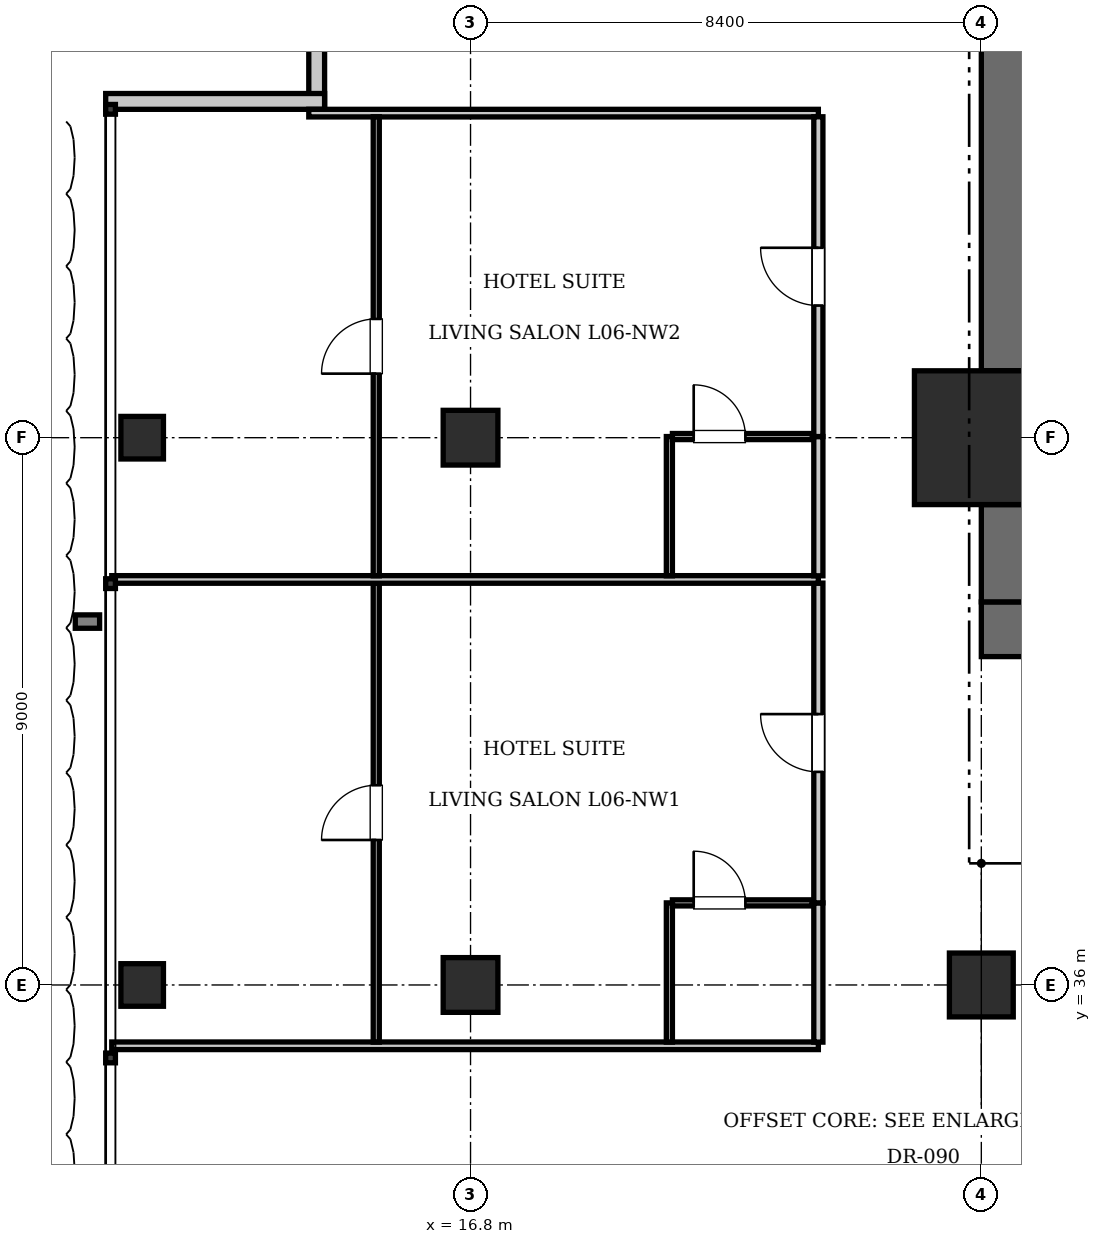
"""IFC4 building model, lengths in metres.
Left out: names, types, materials, properties, quantities, classifications, styles, units other than length and angle.
Written with IfcOpenShell. Run it as: python <this file> out.ifc"""

import sys

from ifc_helpers import new_model, si_unit, direction, frame, frame_2d, origin, origin_2d, place, context, subcontext, project, spatial, rectangle, i_section, extrude, element, fill, save


model = new_model("IFC4")
c1 = context("Model", 3, precision=1e-05, world=origin(), true_north=direction((0.0, 1.0)))
c2 = subcontext(c1, "Body", "Model", "MODEL_VIEW")
j1 = project(units=[si_unit("LENGTHUNIT", "METRE"), si_unit("PLANEANGLEUNIT", "RADIAN")], contexts=[c1])
p1 = place(None, origin())
s1 = spatial("IfcSite", under=j1, at=p1, CompositionType="ELEMENT")
p2 = place(p1, origin())
s2 = spatial("IfcBuilding", under=s1, at=p2, CompositionType="ELEMENT")
p3 = place(p2, frame((0.0, 0.0, 30.8)))
s3 = spatial("IfcBuildingStorey", under=s2, at=p3, CompositionType="ELEMENT", Elevation=30.8)
p4 = place(p3, frame((25.2, 45.0, 0.0), z_axis=(0.0, 0.0, 1.0), x_axis=(1.0, 0.0, 0.0)))
e1 = element("IfcColumn", 1, at=p4, inside=s3, PredefinedType="COLUMN", context=c2, shape_type="SweptSolid", body=[
    extrude(rectangle(XDim=2.2, YDim=2.2, at=origin_2d()), origin(), (0.0, 0.0, 1.0), 3.85),
])
p5 = place(p3, frame((25.2, 41.85, 0.0), z_axis=(0.0, 0.0, 1.0), x_axis=(1.0, 0.0, 0.0)))
e2 = element("IfcWall", 2, at=p5, inside=s3, PredefinedType="SHEAR", context=c2, shape_type="SweptSolid", body=[
    extrude(rectangle(XDim=6.8, YDim=0.9, at=frame_2d((3.4, 0.0))), origin(), (0.0, 0.0, 1.0), 3.85),
])
p6 = place(p5, frame((1.65, 0.0, 0.0)))
e3 = element("IfcOpeningElement", 3, at=p6, cuts=e2, PredefinedType="OPENING", context=c2, shape_type="SweptSolid", body=[
    extrude(rectangle(XDim=1.15, YDim=2.15, at=frame_2d((0.575, 1.075))), frame((0.0, 0.46, 0.0), z_axis=(0.0, -1.0, 0.0), x_axis=(1.0, 0.0, 0.0)), (0.0, 0.0, 1.0), 0.92),
])
p7 = place(p5, frame((5.15, 0.0, 0.0)))
e4 = element("IfcOpeningElement", 4, at=p7, cuts=e2, PredefinedType="OPENING", context=c2, shape_type="SweptSolid", body=[
    extrude(rectangle(XDim=1.1, YDim=2.2, at=frame_2d((0.55, 1.1))), frame((0.0, 0.46, 0.0), z_axis=(0.0, -1.0, 0.0), x_axis=(1.0, 0.0, 0.0)), (0.0, 0.0, 1.0), 0.92),
])
p8 = place(p3, frame((25.65, 42.3, 0.0), z_axis=(0.0, 0.0, 1.0), x_axis=(0.0, 1.0, 0.0)))
e5 = element("IfcWall", 5, at=p8, inside=s3, PredefinedType="SHEAR", context=c2, shape_type="SweptSolid", body=[
    extrude(rectangle(XDim=1.6, YDim=0.9, at=frame_2d((0.8, 0.0))), origin(), (0.0, 0.0, 1.0), 3.85),
])
p9 = place(p3, frame((25.65, 46.1, 0.0), z_axis=(0.0, 0.0, 1.0), x_axis=(0.0, 1.0, 0.0)))
e6 = element("IfcWall", 6, at=p9, inside=s3, PredefinedType="SHEAR", context=c2, shape_type="SweptSolid", body=[
    extrude(rectangle(XDim=7.0, YDim=0.9, at=frame_2d((3.5, 0.0))), origin(), (0.0, 0.0, 1.0), 3.85),
])
p10 = place(p3, frame((25.2, 36.0, 0.0), z_axis=(0.0, 0.0, 1.0), x_axis=(1.0, 0.0, 0.0)))
e7 = element("IfcColumn", 7, at=p10, inside=s3, PredefinedType="COLUMN", context=c2, shape_type="SweptSolid", body=[
    extrude(rectangle(XDim=1.05, YDim=1.05, at=origin_2d()), origin(), (0.0, 0.0, 1.0), 3.85),
])
for number, where, z_axis, x_axis in (
    (8, (16.8, 36.0, 0.0), (0.0, 0.0, 1.0), (1.0, 0.0, 0.0)),
    (9, (16.8, 45.0, 0.0), (0.0, 0.0, 1.0), (1.0, 0.0, 0.0)),
):
    element("IfcColumn", number, at=place(p3, frame(where, z_axis=z_axis, x_axis=x_axis)), inside=s3, PredefinedType="COLUMN", context=c2, shape_type="SweptSolid", body=[
        extrude(rectangle(XDim=0.9, YDim=0.9, at=origin_2d()), origin(), (0.0, 0.0, 1.0), 3.85),
    ])
for number, where, z_axis, x_axis in (
    (10, (11.4, 36.0, 0.0), (0.0, 0.0, 1.0), (1.0, 0.0, 0.0)),
    (11, (11.4, 45.0, 0.0), (0.0, 0.0, 1.0), (1.0, 0.0, 0.0)),
):
    element("IfcColumn", number, at=place(p3, frame(where, z_axis=z_axis, x_axis=x_axis)), inside=s3, PredefinedType="COLUMN", context=c2, shape_type="SweptSolid", body=[
        extrude(i_section(OverallWidth=0.7, OverallDepth=0.7, WebThickness=0.028, FlangeThickness=0.044, at=origin_2d()), origin(), (0.0, 0.0, 1.0), 3.85),
    ])
p11 = place(p3, frame((14.27, 50.4, 0.0), z_axis=(0.0, 0.0, 1.0), x_axis=(0.0, 1.0, 0.0)))
e12 = element("IfcWall", 12, at=p11, inside=s3, PredefinedType="SOLIDWALL", context=c2, shape_type="SweptSolid", body=[
    extrude(rectangle(XDim=3.6, YDim=0.26, at=frame_2d((1.8, 0.0))), origin(), (0.0, 0.0, 1.0), 3.61),
])
p12 = place(p3, frame((10.8, 50.53, 0.0), z_axis=(0.0, 0.0, 1.0), x_axis=(1.0, 0.0, 0.0)))
e13 = element("IfcWall", 13, at=p12, inside=s3, PredefinedType="SOLIDWALL", context=c2, shape_type="SweptSolid", body=[
    extrude(rectangle(XDim=3.6, YDim=0.26, at=frame_2d((1.8, 0.0))), origin(), (0.0, 0.0, 1.0), 3.61),
])
p13 = place(p3, frame((10.9, 35.0, 0.0), z_axis=(0.0, 0.0, 1.0), x_axis=(1.0, 0.0, 0.0)))
e14 = element("IfcWall", 14, at=p13, inside=s3, PredefinedType="PARTITIONING", context=c2, shape_type="SweptSolid", body=[
    extrude(rectangle(XDim=11.62, YDim=0.125, at=frame_2d((5.81, 0.0))), origin(), (0.0, 0.0, 1.0), 3.61),
])
p14 = place(p3, frame((14.14, 50.337, 0.0), z_axis=(0.0, 0.0, 1.0), x_axis=(1.0, 0.0, 0.0)))
e15 = element("IfcWall", 15, at=p14, inside=s3, PredefinedType="PARTITIONING", context=c2, shape_type="SweptSolid", body=[
    extrude(rectangle(XDim=8.38, YDim=0.125, at=frame_2d((4.19, 0.0))), origin(), (0.0, 0.0, 1.0), 3.61),
])
p15 = place(p3, frame((22.52, 35.06, 0.0), z_axis=(0.0, 0.0, 1.0), x_axis=(0.0, 1.0, 0.0)))
e16 = element("IfcWall", 16, at=p15, inside=s3, PredefinedType="PARTITIONING", context=c2, shape_type="SweptSolid", body=[
    extrude(rectangle(XDim=2.29, YDim=0.15, at=frame_2d((1.145, 0.0))), origin(), (0.0, 0.0, 1.0), 3.61),
])
p16 = place(p3, frame((22.52, 37.35, 0.0), z_axis=(0.0, 0.0, 1.0), x_axis=(0.0, 1.0, 0.0)))
e17 = element("IfcWall", 17, at=p16, inside=s3, PredefinedType="PARTITIONING", context=c2, shape_type="SweptSolid", body=[
    extrude(rectangle(XDim=5.259, YDim=0.15, at=frame_2d((2.629, 0.0))), origin(), (0.0, 0.0, 1.0), 3.61),
])
p17 = place(p16, frame((2.154, 0.0, 0.0)))
e18 = element("IfcOpeningElement", 18, at=p17, cuts=e17, PredefinedType="OPENING", context=c2, shape_type="SweptSolid", body=[
    extrude(rectangle(XDim=0.95, YDim=2.15, at=frame_2d((0.475, 1.075))), frame((0.0, 0.085, 0.0), z_axis=(0.0, -1.0, 0.0), x_axis=(1.0, 0.0, 0.0)), (0.0, 0.0, 1.0), 0.17),
])
p18 = place(p3, frame((20.07, 35.06, 0.0), z_axis=(0.0, 0.0, 1.0), x_axis=(0.0, 1.0, 0.0)))
e19 = element("IfcWall", 19, at=p18, inside=s3, PredefinedType="PARTITIONING", context=c2, shape_type="SweptSolid", body=[
    extrude(rectangle(XDim=2.29, YDim=0.1, at=frame_2d((1.145, 0.0))), origin(), (0.0, 0.0, 1.0), 3.61),
])
p19 = place(p3, frame((20.12, 37.35, 0.0), z_axis=(0.0, 0.0, 1.0), x_axis=(1.0, 0.0, 0.0)))
e20 = element("IfcWall", 20, at=p19, inside=s3, PredefinedType="PARTITIONING", context=c2, shape_type="SweptSolid", body=[
    extrude(rectangle(XDim=2.3, YDim=0.1, at=frame_2d((1.15, 0.0))), origin(), (0.0, 0.0, 1.0), 3.61),
])
p20 = place(p19, frame((0.35, 0.0, 0.0)))
e21 = element("IfcOpeningElement", 21, at=p20, cuts=e20, PredefinedType="OPENING", context=c2, shape_type="SweptSolid", body=[
    extrude(rectangle(XDim=0.85, YDim=2.1, at=frame_2d((0.425, 1.05))), frame((0.0, 0.06, 0.0), z_axis=(0.0, -1.0, 0.0), x_axis=(1.0, 0.0, 0.0)), (0.0, 0.0, 1.0), 0.12),
])
p21 = place(p3, frame((15.25, 35.06, 0.0), z_axis=(0.0, 0.0, 1.0), x_axis=(0.0, 1.0, 0.0)))
e22 = element("IfcWall", 22, at=p21, inside=s3, PredefinedType="PARTITIONING", context=c2, shape_type="SweptSolid", body=[
    extrude(rectangle(XDim=7.549, YDim=0.1, at=frame_2d((3.774, 0.0))), origin(), (0.0, 0.0, 1.0), 3.61),
])
p22 = place(p21, frame((3.324, 0.0, 0.0)))
e23 = element("IfcOpeningElement", 23, at=p22, cuts=e22, PredefinedType="OPENING", context=c2, shape_type="SweptSolid", body=[
    extrude(rectangle(XDim=0.9, YDim=2.1, at=frame_2d((0.45, 1.05))), frame((0.0, 0.06, 0.0), z_axis=(0.0, -1.0, 0.0), x_axis=(1.0, 0.0, 0.0)), (0.0, 0.0, 1.0), 0.12),
])
p23 = place(p3, frame((10.9, 42.669, 0.0), z_axis=(0.0, 0.0, 1.0), x_axis=(1.0, 0.0, 0.0)))
e24 = element("IfcWall", 24, at=p23, inside=s3, PredefinedType="PARTITIONING", context=c2, shape_type="SweptSolid", body=[
    extrude(rectangle(XDim=11.62, YDim=0.125, at=frame_2d((5.81, 0.0))), origin(), (0.0, 0.0, 1.0), 3.61),
])
p24 = place(p3, frame((22.52, 42.729, 0.0), z_axis=(0.0, 0.0, 1.0), x_axis=(0.0, 1.0, 0.0)))
e25 = element("IfcWall", 25, at=p24, inside=s3, PredefinedType="PARTITIONING", context=c2, shape_type="SweptSolid", body=[
    extrude(rectangle(XDim=2.29, YDim=0.15, at=frame_2d((1.145, 0.0))), origin(), (0.0, 0.0, 1.0), 3.61),
])
p25 = place(p3, frame((22.52, 45.019, 0.0), z_axis=(0.0, 0.0, 1.0), x_axis=(0.0, 1.0, 0.0)))
e26 = element("IfcWall", 26, at=p25, inside=s3, PredefinedType="PARTITIONING", context=c2, shape_type="SweptSolid", body=[
    extrude(rectangle(XDim=5.259, YDim=0.15, at=frame_2d((2.629, 0.0))), origin(), (0.0, 0.0, 1.0), 3.61),
])
p26 = place(p25, frame((2.154, 0.0, 0.0)))
e27 = element("IfcOpeningElement", 27, at=p26, cuts=e26, PredefinedType="OPENING", context=c2, shape_type="SweptSolid", body=[
    extrude(rectangle(XDim=0.95, YDim=2.15, at=frame_2d((0.475, 1.075))), frame((0.0, 0.085, 0.0), z_axis=(0.0, -1.0, 0.0), x_axis=(1.0, 0.0, 0.0)), (0.0, 0.0, 1.0), 0.17),
])
p27 = place(p3, frame((20.07, 42.729, 0.0), z_axis=(0.0, 0.0, 1.0), x_axis=(0.0, 1.0, 0.0)))
e28 = element("IfcWall", 28, at=p27, inside=s3, PredefinedType="PARTITIONING", context=c2, shape_type="SweptSolid", body=[
    extrude(rectangle(XDim=2.29, YDim=0.1, at=frame_2d((1.145, 0.0))), origin(), (0.0, 0.0, 1.0), 3.61),
])
p28 = place(p3, frame((20.12, 45.019, 0.0), z_axis=(0.0, 0.0, 1.0), x_axis=(1.0, 0.0, 0.0)))
e29 = element("IfcWall", 29, at=p28, inside=s3, PredefinedType="PARTITIONING", context=c2, shape_type="SweptSolid", body=[
    extrude(rectangle(XDim=2.3, YDim=0.1, at=frame_2d((1.15, 0.0))), origin(), (0.0, 0.0, 1.0), 2.975),
])
p29 = place(p28, frame((0.35, 0.0, 0.0)))
e30 = element("IfcOpeningElement", 30, at=p29, cuts=e29, PredefinedType="OPENING", context=c2, shape_type="SweptSolid", body=[
    extrude(rectangle(XDim=0.85, YDim=2.1, at=frame_2d((0.425, 1.05))), frame((0.0, 0.06, 0.0), z_axis=(0.0, -1.0, 0.0), x_axis=(1.0, 0.0, 0.0)), (0.0, 0.0, 1.0), 0.12),
])
p30 = place(p3, frame((15.25, 42.729, 0.0), z_axis=(0.0, 0.0, 1.0), x_axis=(0.0, 1.0, 0.0)))
e31 = element("IfcWall", 31, at=p30, inside=s3, PredefinedType="PARTITIONING", context=c2, shape_type="SweptSolid", body=[
    extrude(rectangle(XDim=7.549, YDim=0.1, at=frame_2d((3.774, 0.0))), origin(), (0.0, 0.0, 1.0), 3.61),
])
p31 = place(p30, frame((3.324, 0.0, 0.0)))
e32 = element("IfcOpeningElement", 32, at=p31, cuts=e31, PredefinedType="OPENING", context=c2, shape_type="SweptSolid", body=[
    extrude(rectangle(XDim=0.9, YDim=2.1, at=frame_2d((0.45, 1.05))), frame((0.0, 0.06, 0.0), z_axis=(0.0, -1.0, 0.0), x_axis=(1.0, 0.0, 0.0)), (0.0, 0.0, 1.0), 0.12),
])
p32 = place(p20, origin())
e33 = element("IfcDoor", 33, at=p32, inside=s3, OperationType="SINGLE_SWING_LEFT", PredefinedType="DOOR", context=c2, shape_type="SweptSolid", body=[
    extrude(rectangle(XDim=0.85, YDim=2.1, at=frame_2d((0.425, 1.05))), frame((0.0, 0.025, 0.0), z_axis=(0.0, -1.0, 0.0), x_axis=(1.0, 0.0, 0.0)), (0.0, 0.0, 1.0), 0.05),
])
fill(e21, e33)
p33 = place(p17, origin())
e34 = element("IfcDoor", 34, at=p33, inside=s3, OperationType="SINGLE_SWING_RIGHT", PredefinedType="DOOR", context=c2, shape_type="SweptSolid", body=[
    extrude(rectangle(XDim=0.95, YDim=2.15, at=frame_2d((0.475, 1.075))), frame((0.0, 0.025, 0.0), z_axis=(0.0, -1.0, 0.0), x_axis=(1.0, 0.0, 0.0)), (0.0, 0.0, 1.0), 0.05),
])
fill(e18, e34)
p34 = place(p22, origin())
e35 = element("IfcDoor", 35, at=p34, inside=s3, OperationType="SINGLE_SWING_LEFT", PredefinedType="DOOR", context=c2, shape_type="SweptSolid", body=[
    extrude(rectangle(XDim=0.9, YDim=2.1, at=frame_2d((0.45, 1.05))), frame((0.0, 0.025, 0.0), z_axis=(0.0, -1.0, 0.0), x_axis=(1.0, 0.0, 0.0)), (0.0, 0.0, 1.0), 0.05),
])
fill(e23, e35)
p35 = place(p29, origin())
e36 = element("IfcDoor", 36, at=p35, inside=s3, OperationType="SINGLE_SWING_LEFT", PredefinedType="DOOR", context=c2, shape_type="SweptSolid", body=[
    extrude(rectangle(XDim=0.85, YDim=2.1, at=frame_2d((0.425, 1.05))), frame((0.0, 0.025, 0.0), z_axis=(0.0, -1.0, 0.0), x_axis=(1.0, 0.0, 0.0)), (0.0, 0.0, 1.0), 0.05),
])
fill(e30, e36)
p36 = place(p26, origin())
e37 = element("IfcDoor", 37, at=p36, inside=s3, OperationType="SINGLE_SWING_RIGHT", PredefinedType="DOOR", context=c2, shape_type="SweptSolid", body=[
    extrude(rectangle(XDim=0.95, YDim=2.15, at=frame_2d((0.475, 1.075))), frame((0.0, 0.025, 0.0), z_axis=(0.0, -1.0, 0.0), x_axis=(1.0, 0.0, 0.0)), (0.0, 0.0, 1.0), 0.05),
])
fill(e27, e37)
p37 = place(p31, origin())
e38 = element("IfcDoor", 38, at=p37, inside=s3, OperationType="SINGLE_SWING_LEFT", PredefinedType="DOOR", context=c2, shape_type="SweptSolid", body=[
    extrude(rectangle(XDim=0.9, YDim=2.1, at=frame_2d((0.45, 1.05))), frame((0.0, 0.025, 0.0), z_axis=(0.0, -1.0, 0.0), x_axis=(1.0, 0.0, 0.0)), (0.0, 0.0, 1.0), 0.05),
])
fill(e32, e38)
save(model, sys.argv[1])
